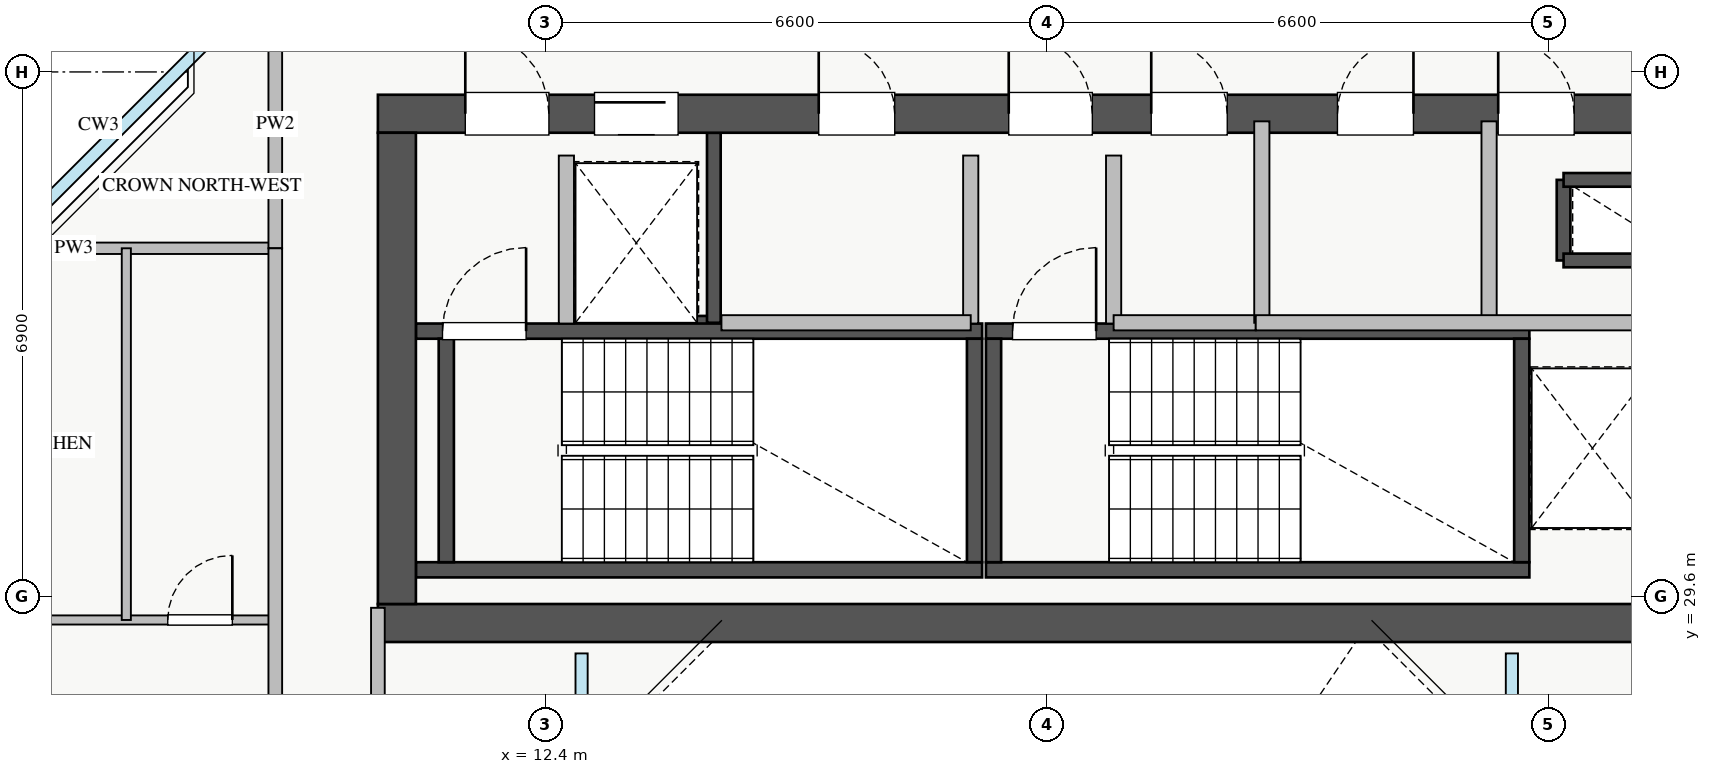
"""IFC4 building model, lengths in metres.
Left out: names, types, materials, properties, quantities, classifications, styles, units other than length and angle.
Written with IfcOpenShell. Run it as: python <this file> out.ifc"""

import sys

from ifc_helpers import new_model, si_unit, direction, frame, frame_2d, origin, place, context, subcontext, project, spatial, rectangle, extrude, source, transform, mapped, element, fill, save


model = new_model("IFC4")
c1 = context("Model", 3, precision=1e-05, world=origin(), true_north=direction((0.0, 1.0)))
c2 = subcontext(c1, "Body", "Model", "MODEL_VIEW")
j1 = project(units=[si_unit("LENGTHUNIT", "METRE"), si_unit("PLANEANGLEUNIT", "RADIAN")], contexts=[c1])
p1 = place(None, origin())
s1 = spatial("IfcSite", under=j1, at=p1, CompositionType="ELEMENT")
p2 = place(p1, origin())
s2 = spatial("IfcBuilding", under=s1, at=p2, CompositionType="ELEMENT")
p3 = place(p2, frame((0.0, 0.0, 247.0)))
s3 = spatial("IfcBuildingStorey", under=s2, at=p3, CompositionType="ELEMENT", Elevation=247.0)
p4 = place(p3, frame((12.68, 33.2, 0.0), z_axis=(0.0, 0.0, 1.0), x_axis=(1.0, 0.0, 0.0)))
e1 = element("IfcWall", 1, at=p4, inside=s3, PredefinedType="SHEAR", context=c2, shape_type="SweptSolid", body=[
    extrude(rectangle(XDim=1.94, YDim=0.18, at=frame_2d((0.97, 0.0))), origin(), (0.0, 0.0, 1.0), 3.07),
])
p5 = place(p3, frame((14.62, 33.2, 0.0), z_axis=(0.0, 0.0, 1.0), x_axis=(0.0, 1.0, 0.0)))
e2 = element("IfcWall", 2, at=p5, inside=s3, PredefinedType="SHEAR", context=c2, shape_type="SweptSolid", body=[
    extrude(rectangle(XDim=2.5, YDim=0.18, at=frame_2d((1.25, 0.0))), origin(), (0.0, 0.0, 1.0), 3.07),
])
p6 = place(p3, frame((25.8, 34.02, 0.0), z_axis=(0.0, 0.0, 1.0), x_axis=(0.0, 1.0, 0.0)))
e3 = element("IfcWall", 3, at=p6, inside=s3, PredefinedType="SHEAR", context=c2, shape_type="SweptSolid", body=[
    extrude(rectangle(XDim=1.06, YDim=0.18, at=frame_2d((0.53, 0.0))), origin(), (0.0, 0.0, 1.0), 3.07),
])
for number, where, z_axis, x_axis in (
    (4, (25.8, 35.08, 0.0), (0.0, 0.0, 1.0), (1.0, 0.0, 0.0)),
    (5, (25.8, 34.02, 0.0), (0.0, 0.0, 1.0), (1.0, 0.0, 0.0)),
):
    element("IfcWall", number, at=place(p3, frame(where, z_axis=z_axis, x_axis=x_axis)), inside=s3, PredefinedType="SHEAR", context=c2, shape_type="SweptSolid", body=[
        extrude(rectangle(XDim=1.5, YDim=0.18, at=frame_2d((0.75, 0.0))), origin(), (0.0, 0.0, 1.0), 3.07),
    ])
p7 = place(p3, frame((10.7, 29.95, 0.0), z_axis=(0.0, 0.0, 1.0), x_axis=(1.0, 0.0, 0.0)))
e6 = element("IfcWall", 6, at=p7, inside=s3, PredefinedType="SHEAR", context=c2, shape_type="SweptSolid", body=[
    extrude(rectangle(XDim=7.45, YDim=0.2, at=frame_2d((3.725, 0.0))), origin(), (0.0, 0.0, 1.0), 3.25),
])
p8 = place(p3, frame((10.7, 33.09, 0.0), z_axis=(0.0, 0.0, 1.0), x_axis=(1.0, 0.0, 0.0)))
e7 = element("IfcWall", 7, at=p8, inside=s3, PredefinedType="SHEAR", context=c2, shape_type="SweptSolid", body=[
    extrude(rectangle(XDim=7.45, YDim=0.2, at=frame_2d((3.725, 0.0))), origin(), (0.0, 0.0, 1.0), 3.25),
])
p9 = place(p8, frame((0.35, 0.0, 0.0)))
e8 = element("IfcOpeningElement", 8, at=p9, cuts=e7, PredefinedType="OPENING", context=c2, shape_type="SweptSolid", body=[
    extrude(rectangle(XDim=1.1, YDim=2.05, at=frame_2d((0.55, 1.025))), frame((0.0, 0.11, 0.0), z_axis=(0.0, -1.0, 0.0), x_axis=(1.0, 0.0, 0.0)), (0.0, 0.0, 1.0), 0.22),
])
for number, where, z_axis, x_axis in (
    (9, (11.1, 30.05, 0.0), (0.0, 0.0, 1.0), (0.0, 1.0, 0.0)),
    (10, (18.05, 30.05, 0.0), (0.0, 0.0, 1.0), (0.0, 1.0, 0.0)),
):
    element("IfcWall", number, at=place(p3, frame(where, z_axis=z_axis, x_axis=x_axis)), inside=s3, PredefinedType="SHEAR", context=c2, shape_type="SweptSolid", body=[
        extrude(rectangle(XDim=2.94, YDim=0.2, at=frame_2d((1.47, 0.0))), origin(), (0.0, 0.0, 1.0), 3.25),
    ])
p10 = place(p3, frame((18.2, 29.95, 0.0), z_axis=(0.0, 0.0, 1.0), x_axis=(1.0, 0.0, 0.0)))
e11 = element("IfcWall", 11, at=p10, inside=s3, PredefinedType="SHEAR", context=c2, shape_type="SweptSolid", body=[
    extrude(rectangle(XDim=7.15, YDim=0.2, at=frame_2d((3.575, 0.0))), origin(), (0.0, 0.0, 1.0), 3.25),
])
p11 = place(p3, frame((18.2, 33.09, 0.0), z_axis=(0.0, 0.0, 1.0), x_axis=(1.0, 0.0, 0.0)))
e12 = element("IfcWall", 12, at=p11, inside=s3, PredefinedType="SHEAR", context=c2, shape_type="SweptSolid", body=[
    extrude(rectangle(XDim=7.15, YDim=0.2, at=frame_2d((3.575, 0.0))), origin(), (0.0, 0.0, 1.0), 3.25),
])
p12 = place(p11, frame((0.35, 0.0, 0.0)))
e13 = element("IfcOpeningElement", 13, at=p12, cuts=e12, PredefinedType="OPENING", context=c2, shape_type="SweptSolid", body=[
    extrude(rectangle(XDim=1.1, YDim=2.05, at=frame_2d((0.55, 1.025))), frame((0.0, 0.11, 0.0), z_axis=(0.0, -1.0, 0.0), x_axis=(1.0, 0.0, 0.0)), (0.0, 0.0, 1.0), 0.22),
])
for number, where, z_axis, x_axis in (
    (14, (18.3, 30.05, 0.0), (0.0, 0.0, 1.0), (0.0, 1.0, 0.0)),
    (15, (25.25, 30.05, 0.0), (0.0, 0.0, 1.0), (0.0, 1.0, 0.0)),
):
    element("IfcWall", number, at=place(p3, frame(where, z_axis=z_axis, x_axis=x_axis)), inside=s3, PredefinedType="SHEAR", context=c2, shape_type="SweptSolid", body=[
        extrude(rectangle(XDim=2.94, YDim=0.2, at=frame_2d((1.47, 0.0))), origin(), (0.0, 0.0, 1.0), 3.25),
    ])
p13 = place(p3, frame((10.2, 29.25, 0.0), z_axis=(0.0, 0.0, 1.0), x_axis=(1.0, 0.0, 0.0)))
e16 = element("IfcWall", 16, at=p13, inside=s3, PredefinedType="SHEAR", context=c2, shape_type="SweptSolid", body=[
    extrude(rectangle(XDim=17.6, YDim=0.5, at=frame_2d((8.8, 0.0))), origin(), (0.0, 0.0, 1.0), 3.25),
])
p14 = place(p3, frame((10.2, 35.95, 0.0), z_axis=(0.0, 0.0, 1.0), x_axis=(1.0, 0.0, 0.0)))
e17 = element("IfcWall", 17, at=p14, inside=s3, PredefinedType="SHEAR", context=c2, shape_type="SweptSolid", body=[
    extrude(rectangle(XDim=17.6, YDim=0.5, at=frame_2d((8.8, 0.0))), origin(), (0.0, 0.0, 1.0), 3.25),
])
p15 = place(p14, frame((1.15, 0.0, 0.0)))
e18 = element("IfcOpeningElement", 18, at=p15, cuts=e17, PredefinedType="OPENING", context=c2, shape_type="SweptSolid", body=[
    extrude(rectangle(XDim=1.1, YDim=2.05, at=frame_2d((0.55, 1.025))), frame((0.0, 0.26, 0.0), z_axis=(0.0, -1.0, 0.0), x_axis=(1.0, 0.0, 0.0)), (0.0, 0.0, 1.0), 0.52),
])
p16 = place(p14, frame((8.3, 0.0, 0.0)))
e19 = element("IfcOpeningElement", 19, at=p16, cuts=e17, PredefinedType="OPENING", context=c2, shape_type="SweptSolid", body=[
    extrude(rectangle(XDim=1.1, YDim=2.05, at=frame_2d((0.55, 1.025))), frame((0.0, 0.26, 0.0), z_axis=(0.0, -1.0, 0.0), x_axis=(1.0, 0.0, 0.0)), (0.0, 0.0, 1.0), 0.52),
])
p17 = place(p14, frame((2.85, 0.0, 0.0)))
e20 = element("IfcOpeningElement", 20, at=p17, cuts=e17, PredefinedType="OPENING", context=c2, shape_type="SweptSolid", body=[
    extrude(rectangle(XDim=1.1, YDim=2.05, at=frame_2d((0.55, 1.025))), frame((0.0, 0.26, 0.0), z_axis=(0.0, -1.0, 0.0), x_axis=(1.0, 0.0, 0.0)), (0.0, 0.0, 1.0), 0.52),
])
p18 = place(p14, frame((5.8, 0.0, 0.0)))
e21 = element("IfcOpeningElement", 21, at=p18, cuts=e17, PredefinedType="OPENING", context=c2, shape_type="SweptSolid", body=[
    extrude(rectangle(XDim=1.0, YDim=2.05, at=frame_2d((0.5, 1.025))), frame((0.0, 0.26, 0.0), z_axis=(0.0, -1.0, 0.0), x_axis=(1.0, 0.0, 0.0)), (0.0, 0.0, 1.0), 0.52),
])
p19 = place(p14, frame((14.74, 0.0, 0.0)))
e22 = element("IfcOpeningElement", 22, at=p19, cuts=e17, PredefinedType="OPENING", context=c2, shape_type="SweptSolid", body=[
    extrude(rectangle(XDim=1.0, YDim=2.05, at=frame_2d((0.5, 1.025))), frame((0.0, 0.26, 0.0), z_axis=(0.0, -1.0, 0.0), x_axis=(1.0, 0.0, 0.0)), (0.0, 0.0, 1.0), 0.52),
])
p20 = place(p14, frame((10.175, 0.0, 0.0)))
e23 = element("IfcOpeningElement", 23, at=p20, cuts=e17, PredefinedType="OPENING", context=c2, shape_type="SweptSolid", body=[
    extrude(rectangle(XDim=1.0, YDim=2.05, at=frame_2d((0.5, 1.025))), frame((0.0, 0.26, 0.0), z_axis=(0.0, -1.0, 0.0), x_axis=(1.0, 0.0, 0.0)), (0.0, 0.0, 1.0), 0.52),
])
p21 = place(p14, frame((12.625, 0.0, 0.0)))
e24 = element("IfcOpeningElement", 24, at=p21, cuts=e17, PredefinedType="OPENING", context=c2, shape_type="SweptSolid", body=[
    extrude(rectangle(XDim=1.0, YDim=2.05, at=frame_2d((0.5, 1.025))), frame((0.0, 0.26, 0.0), z_axis=(0.0, -1.0, 0.0), x_axis=(1.0, 0.0, 0.0)), (0.0, 0.0, 1.0), 0.52),
])
p22 = place(p3, frame((10.45, 29.5, 0.0), z_axis=(0.0, 0.0, 1.0), x_axis=(0.0, 1.0, 0.0)))
e25 = element("IfcWall", 25, at=p22, inside=s3, PredefinedType="SHEAR", context=c2, shape_type="SweptSolid", body=[
    extrude(rectangle(XDim=6.2, YDim=0.5, at=frame_2d((3.1, 0.0))), origin(), (0.0, 0.0, 1.0), 3.25),
])
for number, where, z_axis, x_axis in (
    (26, (12.68, 33.19, 0.0), (0.0, 0.0, 1.0), (0.0, 1.0, 0.0)),
    (27, (18.0, 33.19, 0.0), (0.0, 0.0, 1.0), (0.0, 1.0, 0.0)),
    (28, (19.88, 33.19, 0.0), (0.0, 0.0, 1.0), (0.0, 1.0, 0.0)),
):
    element("IfcWall", number, at=place(p3, frame(where, z_axis=z_axis, x_axis=x_axis)), inside=s3, PredefinedType="PARTITIONING", context=c2, shape_type="SweptSolid", body=[
        extrude(rectangle(XDim=2.21, YDim=0.2, at=frame_2d((1.105, 0.0))), origin(), (0.0, 0.0, 1.0), 3.07),
    ])
p23 = place(p3, frame((14.72, 33.2, 0.0), z_axis=(0.0, 0.0, 1.0), x_axis=(1.0, 0.0, 0.0)))
e29 = element("IfcWall", 29, at=p23, inside=s3, PredefinedType="PARTITIONING", context=c2, shape_type="SweptSolid", body=[
    extrude(rectangle(XDim=3.28, YDim=0.2, at=frame_2d((1.64, 0.0))), origin(), (0.0, 0.0, 1.0), 3.07),
])
p24 = place(p3, frame((24.82, 33.2, 0.0), z_axis=(0.0, 0.0, 1.0), x_axis=(0.0, 1.0, 0.0)))
e30 = element("IfcWall", 30, at=p24, inside=s3, PredefinedType="PARTITIONING", context=c2, shape_type="SweptSolid", body=[
    extrude(rectangle(XDim=2.65, YDim=0.2, at=frame_2d((1.325, 0.0))), origin(), (0.0, 0.0, 1.0), 3.07),
])
p25 = place(p3, frame((19.88, 33.2, 0.0), z_axis=(0.0, 0.0, 1.0), x_axis=(1.0, 0.0, 0.0)))
e31 = element("IfcWall", 31, at=p25, inside=s3, PredefinedType="PARTITIONING", context=c2, shape_type="SweptSolid", body=[
    extrude(rectangle(XDim=1.87, YDim=0.2, at=frame_2d((0.935, 0.0))), origin(), (0.0, 0.0, 1.0), 3.07),
])
p26 = place(p3, frame((21.83, 33.2, 0.0), z_axis=(0.0, 0.0, 1.0), x_axis=(0.0, 1.0, 0.0)))
e32 = element("IfcWall", 32, at=p26, inside=s3, PredefinedType="PARTITIONING", context=c2, shape_type="SweptSolid", body=[
    extrude(rectangle(XDim=2.65, YDim=0.2, at=frame_2d((1.325, 0.0))), origin(), (0.0, 0.0, 1.0), 3.07),
])
p27 = place(p3, frame((21.75, 33.2, 0.0), z_axis=(0.0, 0.0, 1.0), x_axis=(1.0, 0.0, 0.0)))
e33 = element("IfcWall", 33, at=p27, inside=s3, PredefinedType="PARTITIONING", context=c2, shape_type="SweptSolid", body=[
    extrude(rectangle(XDim=5.17, YDim=0.2, at=frame_2d((2.585, 0.0))), origin(), (0.0, 0.0, 1.0), 3.07),
])
p28 = place(p3, frame((3.55, 34.18, 0.0), z_axis=(0.0, 0.0, 1.0), x_axis=(1.0, 0.0, 0.0)))
e34 = element("IfcWall", 34, at=p28, inside=s3, PredefinedType="PARTITIONING", context=c2, shape_type="SweptSolid", body=[
    extrude(rectangle(XDim=5.3, YDim=0.15, at=frame_2d((2.65, 0.0))), origin(), (0.0, 0.0, 1.0), 3.07),
])
p29 = place(p3, frame((8.85, 34.18, 0.0), z_axis=(0.0, 0.0, 1.0), x_axis=(0.0, 1.0, 0.0)))
e35 = element("IfcWall", 35, at=p29, inside=s3, PredefinedType="PARTITIONING", context=c2, shape_type="SweptSolid", body=[
    extrude(rectangle(XDim=3.26, YDim=0.18, at=frame_2d((1.63, 0.0))), origin(), (0.0, 0.0, 1.0), 2.569),
])
p30 = place(p3, frame((3.55, 29.29, 0.0), z_axis=(0.0, 0.0, 1.0), x_axis=(1.0, 0.0, 0.0)))
e36 = element("IfcWall", 36, at=p30, inside=s3, PredefinedType="PLUMBINGWALL", context=c2, shape_type="SweptSolid", body=[
    extrude(rectangle(XDim=5.3, YDim=0.12, at=frame_2d((2.65, 0.0))), origin(), (0.0, 0.0, 1.0), 3.07),
])
p31 = place(p30, frame((1.23, 0.0, 0.0)))
e37 = element("IfcOpeningElement", 37, at=p31, cuts=e36, PredefinedType="OPENING", context=c2, shape_type="SweptSolid", body=[
    extrude(rectangle(XDim=0.9, YDim=2.05, at=frame_2d((0.45, 1.025))), frame((0.0, 0.07, 0.0), z_axis=(0.0, -1.0, 0.0), x_axis=(1.0, 0.0, 0.0)), (0.0, 0.0, 1.0), 0.14),
])
p32 = place(p30, frame((3.885, 0.0, 0.0)))
e38 = element("IfcOpeningElement", 38, at=p32, cuts=e36, PredefinedType="OPENING", context=c2, shape_type="SweptSolid", body=[
    extrude(rectangle(XDim=0.85, YDim=2.05, at=frame_2d((0.425, 1.025))), frame((0.0, 0.07, 0.0), z_axis=(0.0, -1.0, 0.0), x_axis=(1.0, 0.0, 0.0)), (0.0, 0.0, 1.0), 0.14),
])
p33 = place(p3, frame((6.89, 29.29, 0.0), z_axis=(0.0, 0.0, 1.0), x_axis=(0.0, 1.0, 0.0)))
e39 = element("IfcWall", 39, at=p33, inside=s3, PredefinedType="PLUMBINGWALL", context=c2, shape_type="SweptSolid", body=[
    extrude(rectangle(XDim=4.89, YDim=0.12, at=frame_2d((2.445, 0.0))), origin(), (0.0, 0.0, 1.0), 3.07),
])
p34 = place(p3, frame((8.85, 11.82, 0.0), z_axis=(0.0, 0.0, 1.0), x_axis=(0.0, 1.0, 0.0)))
e40 = element("IfcWall", 40, at=p34, inside=s3, PredefinedType="PARTITIONING", context=c2, shape_type="SweptSolid", body=[
    extrude(rectangle(XDim=22.36, YDim=0.18, at=frame_2d((11.18, 0.0))), origin(), (0.0, 0.0, 1.0), 2.569),
])
p35 = place(p34, frame((2.475, 0.0, 0.0)))
e41 = element("IfcOpeningElement", 41, at=p35, cuts=e40, PredefinedType="OPENING", context=c2, shape_type="SweptSolid", body=[
    extrude(rectangle(XDim=1.0, YDim=2.05, at=frame_2d((0.5, 1.025))), frame((0.0, 0.1, 0.0), z_axis=(0.0, -1.0, 0.0), x_axis=(1.0, 0.0, 0.0)), (0.0, 0.0, 1.0), 0.2),
])
p36 = place(p34, frame((13.91, 0.0, 0.0)))
e42 = element("IfcOpeningElement", 42, at=p36, cuts=e40, PredefinedType="OPENING", context=c2, shape_type="SweptSolid", body=[
    extrude(rectangle(XDim=1.0, YDim=2.05, at=frame_2d((0.5, 1.025))), frame((0.0, 0.1, 0.0), z_axis=(0.0, -1.0, 0.0), x_axis=(1.0, 0.0, 0.0)), (0.0, 0.0, 1.0), 0.2),
])
p37 = place(p3, frame((10.2, 16.55, 0.0), z_axis=(0.0, 0.0, 1.0), x_axis=(0.0, 1.0, 0.0)))
e43 = element("IfcWall", 43, at=p37, inside=s3, PredefinedType="PARTITIONING", context=c2, shape_type="SweptSolid", body=[
    extrude(rectangle(XDim=12.9, YDim=0.18, at=frame_2d((6.45, 0.0))), origin(), (0.0, 0.0, 1.0), 3.07),
])
p38 = place(p37, frame((3.425, 0.0, 0.0)))
e44 = element("IfcOpeningElement", 44, at=p38, cuts=e43, PredefinedType="OPENING", context=c2, shape_type="SweptSolid", body=[
    extrude(rectangle(XDim=0.85, YDim=2.05, at=frame_2d((0.425, 1.025))), frame((0.0, 0.1, 0.0), z_axis=(0.0, -1.0, 0.0), x_axis=(1.0, 0.0, 0.0)), (0.0, 0.0, 1.0), 0.2),
])
p39 = place(p37, frame((9.4, 0.0, 0.0)))
e45 = element("IfcOpeningElement", 45, at=p39, cuts=e43, PredefinedType="OPENING", context=c2, shape_type="SweptSolid", body=[
    extrude(rectangle(XDim=0.9, YDim=2.05, at=frame_2d((0.45, 1.025))), frame((0.0, 0.1, 0.0), z_axis=(0.0, -1.0, 0.0), x_axis=(1.0, 0.0, 0.0)), (0.0, 0.0, 1.0), 0.2),
])
m1 = source(origin(), c2, "Body", "SweptSolid", [
    extrude(rectangle(XDim=1.1, YDim=2.05, at=frame_2d((0.55, 1.025))), frame((0.0, 0.025, 0.0), z_axis=(0.0, -1.0, 0.0), x_axis=(1.0, 0.0, 0.0)), (0.0, 0.0, 1.0), 0.05),
])
p40 = place(p15, origin())
e46 = element("IfcDoor", 46, at=p40, inside=s3, OperationType="SINGLE_SWING_LEFT", PredefinedType="DOOR", context=c2, shape_type="MappedRepresentation", body=[
    mapped(m1, transform((0.0, 0.0, 0.0), x_axis=(1.0, 0.0, 0.0), y_axis=(0.0, 1.0, 0.0), z_axis=(0.0, 0.0, 1.0), scale=1.0)),
])
fill(e18, e46)
p41 = place(p9, origin())
e47 = element("IfcDoor", 47, at=p41, inside=s3, OperationType="SINGLE_SWING_RIGHT", PredefinedType="DOOR", context=c2, shape_type="MappedRepresentation", body=[
    mapped(m1, transform((0.0, 0.0, 0.0), x_axis=(1.0, 0.0, 0.0), y_axis=(0.0, 1.0, 0.0), z_axis=(0.0, 0.0, 1.0), scale=1.0)),
])
fill(e8, e47)
p42 = place(p16, origin())
e48 = element("IfcDoor", 48, at=p42, inside=s3, OperationType="SINGLE_SWING_LEFT", PredefinedType="DOOR", context=c2, shape_type="MappedRepresentation", body=[
    mapped(m1, transform((0.0, 0.0, 0.0), x_axis=(1.0, 0.0, 0.0), y_axis=(0.0, 1.0, 0.0), z_axis=(0.0, 0.0, 1.0), scale=1.0)),
])
fill(e19, e48)
p43 = place(p12, origin())
e49 = element("IfcDoor", 49, at=p43, inside=s3, OperationType="SINGLE_SWING_RIGHT", PredefinedType="DOOR", context=c2, shape_type="MappedRepresentation", body=[
    mapped(m1, transform((0.0, 0.0, 0.0), x_axis=(1.0, 0.0, 0.0), y_axis=(0.0, 1.0, 0.0), z_axis=(0.0, 0.0, 1.0), scale=1.0)),
])
fill(e13, e49)
p44 = place(p17, origin())
e50 = element("IfcDoor", 50, at=p44, inside=s3, OperationType="SLIDING_TO_LEFT", PredefinedType="DOOR", context=c2, shape_type="MappedRepresentation", body=[
    mapped(m1, transform((0.0, 0.0, 0.0), x_axis=(1.0, 0.0, 0.0), y_axis=(0.0, 1.0, 0.0), z_axis=(0.0, 0.0, 1.0), scale=1.0)),
])
fill(e20, e50)
m2 = source(origin(), c2, "Body", "SweptSolid", [
    extrude(rectangle(XDim=1.0, YDim=2.05, at=frame_2d((0.5, 1.025))), frame((0.0, 0.025, 0.0), z_axis=(0.0, -1.0, 0.0), x_axis=(1.0, 0.0, 0.0)), (0.0, 0.0, 1.0), 0.05),
])
p45 = place(p18, origin())
e51 = element("IfcDoor", 51, at=p45, inside=s3, OperationType="SINGLE_SWING_LEFT", PredefinedType="DOOR", context=c2, shape_type="MappedRepresentation", body=[
    mapped(m2, transform((0.0, 0.0, 0.0), x_axis=(1.0, 0.0, 0.0), y_axis=(0.0, 1.0, 0.0), z_axis=(0.0, 0.0, 1.0), scale=1.0)),
])
fill(e21, e51)
p46 = place(p19, origin())
e52 = element("IfcDoor", 52, at=p46, inside=s3, OperationType="SINGLE_SWING_LEFT", PredefinedType="DOOR", context=c2, shape_type="MappedRepresentation", body=[
    mapped(m2, transform((0.0, 0.0, 0.0), x_axis=(1.0, 0.0, 0.0), y_axis=(0.0, 1.0, 0.0), z_axis=(0.0, 0.0, 1.0), scale=1.0)),
])
fill(e22, e52)
p47 = place(p20, origin())
e53 = element("IfcDoor", 53, at=p47, inside=s3, OperationType="SINGLE_SWING_LEFT", PredefinedType="DOOR", context=c2, shape_type="MappedRepresentation", body=[
    mapped(m2, transform((0.0, 0.0, 0.0), x_axis=(1.0, 0.0, 0.0), y_axis=(0.0, 1.0, 0.0), z_axis=(0.0, 0.0, 1.0), scale=1.0)),
])
fill(e23, e53)
p48 = place(p21, origin())
e54 = element("IfcDoor", 54, at=p48, inside=s3, OperationType="SINGLE_SWING_RIGHT", PredefinedType="DOOR", context=c2, shape_type="MappedRepresentation", body=[
    mapped(m2, transform((0.0, 0.0, 0.0), x_axis=(1.0, 0.0, 0.0), y_axis=(0.0, 1.0, 0.0), z_axis=(0.0, 0.0, 1.0), scale=1.0)),
])
fill(e24, e54)
m3 = source(origin(), c2, "Body", "SweptSolid", [
    extrude(rectangle(XDim=0.85, YDim=2.05, at=frame_2d((0.425, 1.025))), frame((0.0, 0.025, 0.0), z_axis=(0.0, -1.0, 0.0), x_axis=(1.0, 0.0, 0.0)), (0.0, 0.0, 1.0), 0.05),
])
p49 = place(p32, origin())
e55 = element("IfcDoor", 55, at=p49, inside=s3, OperationType="SINGLE_SWING_RIGHT", PredefinedType="DOOR", context=c2, shape_type="MappedRepresentation", body=[
    mapped(m3, transform((0.0, 0.0, 0.0), x_axis=(1.0, 0.0, 0.0), y_axis=(0.0, 1.0, 0.0), z_axis=(0.0, 0.0, 1.0), scale=1.0)),
])
fill(e38, e55)
save(model, sys.argv[1])
